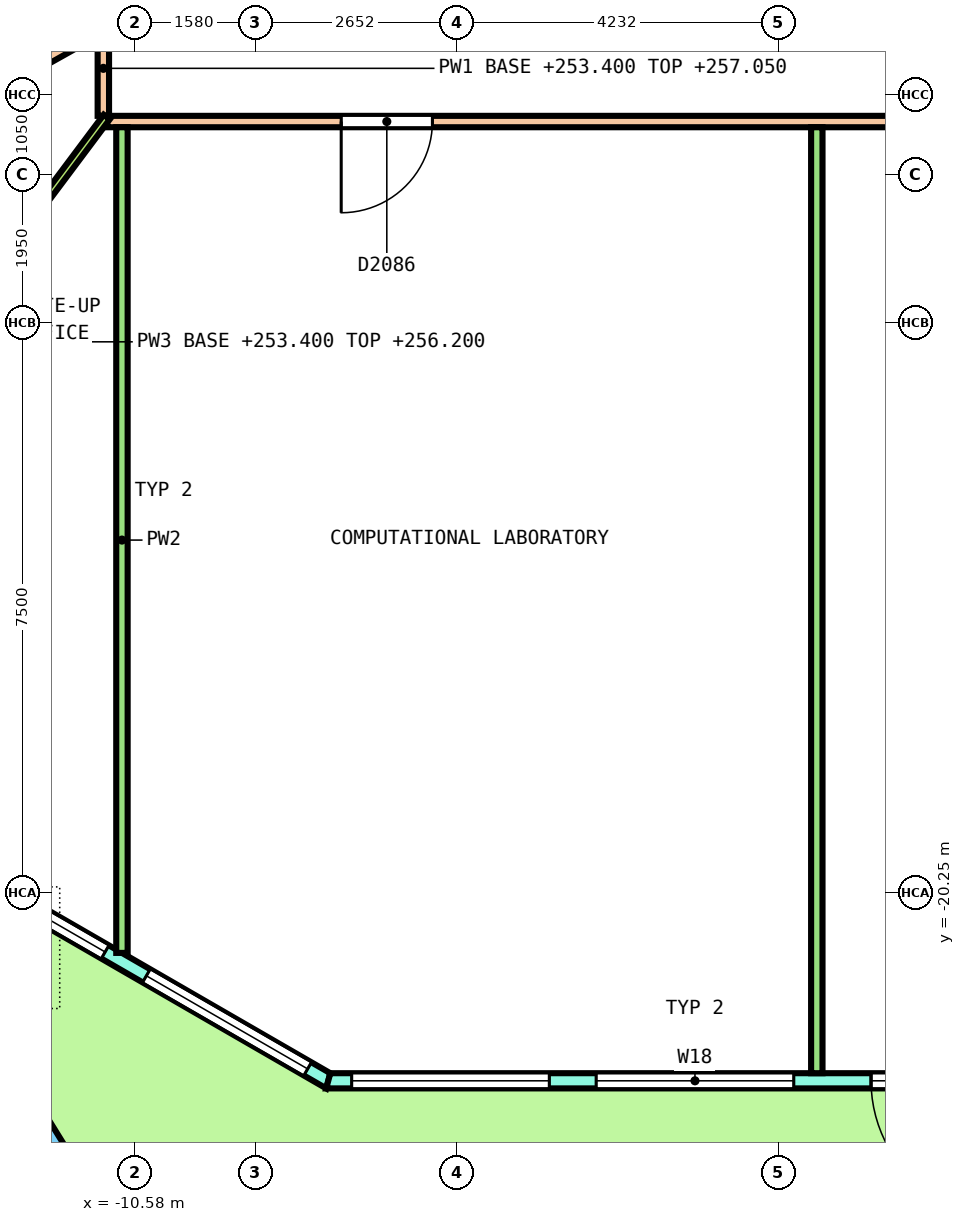
"""IFC4 building model, lengths in metres.
Left out: names, types, materials, properties, quantities, classifications, styles, units other than length and angle.
Written with IfcOpenShell. Run it as: python <this file> out.ifc"""

import sys

from ifc_helpers import new_model, si_unit, direction, frame, frame_2d, origin, origin_2d, place, context, subcontext, project, spatial, polyline, rectangle, outline, extrude, element, fill, save


model = new_model("IFC4")
c1 = context("Model", 3, precision=1e-05, world=origin(), true_north=direction((0.0, 1.0)))
c2 = subcontext(c1, "Body", "Model", "MODEL_VIEW")
j1 = project(units=[si_unit("LENGTHUNIT", "METRE"), si_unit("PLANEANGLEUNIT", "RADIAN")], contexts=[c1])
p1 = place(None, origin())
s1 = spatial("IfcSite", under=j1, at=p1, CompositionType="ELEMENT")
p2 = place(p1, origin())
s2 = spatial("IfcBuilding", under=s1, at=p2, CompositionType="ELEMENT")
p3 = place(p2, frame((0.0, 0.0, 253.4)))
s3 = spatial("IfcBuildingStorey", under=s2, at=p3, CompositionType="ELEMENT", Elevation=253.4)
p4 = place(p3, frame((-12.105, -23.606, 0.0), z_axis=(-0.177997747351, 0.308299619444, 0.934488173595), x_axis=(0.852702618945, -0.425653858356, 0.302848207046)))
e1 = element("IfcColumn", 1, at=p4, inside=s3, PredefinedType="COLUMN", context=c2, shape_type="SweptSolid", body=[
    extrude(rectangle(XDim=1.05, YDim=1.05, at=origin_2d()), origin(), (0.0, 0.0, 1.0), 3.895),
])
p5 = place(p3, frame((-13.369, -19.643, 0.0), z_axis=(0.0, 0.0, 1.0), x_axis=(0.866002544807, -0.50003959082, 0.0)))
e2 = element("IfcWall", 2, at=p5, inside=s3, PredefinedType="SOLIDWALL", context=c2, shape_type="SweptSolid", body=[
    extrude(outline(polyline([(-0.027, -0.1), (1.008, -0.1), (2.042, -0.1), (3.076, -0.1), (4.111, -0.1), (5.145, -0.1), (6.18, -0.1), (6.126, 0.1), (5.109, 0.1), (4.093, 0.1), (3.076, 0.1), (2.06, 0.1), (1.043, 0.1), (0.027, 0.1), (-0.027, -0.1)])), origin(), (0.0, 0.0, 1.0), 3.7),
])
p6 = place(p5, frame((0.313, 0.0, 0.1)))
e3 = element("IfcOpeningElement", 3, at=p6, cuts=e2, PredefinedType="OPENING", context=c2, shape_type="SweptSolid", body=[
    extrude(rectangle(XDim=2.45, YDim=2.65, at=frame_2d((1.225, 1.325))), frame((0.0, 0.11, 0.0), z_axis=(0.0, -1.0, 0.0), x_axis=(1.0, 0.0, 0.0)), (0.0, 0.0, 1.0), 0.22),
])
p7 = place(p5, frame((3.39, 0.0, 0.1)))
e4 = element("IfcOpeningElement", 4, at=p7, cuts=e2, PredefinedType="OPENING", context=c2, shape_type="SweptSolid", body=[
    extrude(rectangle(XDim=2.45, YDim=2.65, at=frame_2d((1.225, 1.325))), frame((0.0, 0.11, 0.0), z_axis=(0.0, -1.0, 0.0), x_axis=(1.0, 0.0, 0.0)), (0.0, 0.0, 1.0), 0.22),
])
p8 = place(p3, frame((-8.041, -22.72, 0.0), z_axis=(0.0, 0.0, 1.0), x_axis=(1.0, 0.0, 0.0)))
e5 = element("IfcWall", 5, at=p8, inside=s3, PredefinedType="SOLIDWALL", context=c2, shape_type="SweptSolid", body=[
    extrude(outline(polyline([(-0.027, -0.1), (0.982, -0.1), (1.99, -0.1), (2.999, -0.1), (4.007, -0.1), (5.016, -0.1), (6.024, -0.1), (7.032, -0.1), (8.041, -0.1), (9.05, -0.1), (10.058, -0.1), (11.066, -0.1), (12.075, -0.1), (13.083, -0.1), (14.092, -0.1), (15.1, -0.1), (16.109, -0.1), (16.055, 0.1), (15.053, 0.1), (14.052, 0.1), (13.05, 0.1), (12.048, 0.1), (11.046, 0.1), (10.044, 0.1), (9.043, 0.1), (8.041, 0.1), (7.039, 0.1), (6.038, 0.1), (5.036, 0.1), (4.034, 0.1), (3.032, 0.1), (2.03, 0.1), (1.029, 0.1), (0.027, 0.1), (-0.027, -0.1)])), origin(), (0.0, 0.0, 1.0), 3.7),
])
p9 = place(p8, frame((0.308, 0.0, 0.1)))
e6 = element("IfcOpeningElement", 6, at=p9, cuts=e5, PredefinedType="OPENING", context=c2, shape_type="SweptSolid", body=[
    extrude(rectangle(XDim=2.6, YDim=2.65, at=frame_2d((1.3, 1.325))), frame((0.0, 0.11, 0.0), z_axis=(0.0, -1.0, 0.0), x_axis=(1.0, 0.0, 0.0)), (0.0, 0.0, 1.0), 0.22),
])
p10 = place(p8, frame((3.524, 0.0, 0.1)))
e7 = element("IfcOpeningElement", 7, at=p10, cuts=e5, PredefinedType="OPENING", context=c2, shape_type="SweptSolid", body=[
    extrude(rectangle(XDim=2.6, YDim=2.65, at=frame_2d((1.3, 1.325))), frame((0.0, 0.11, 0.0), z_axis=(0.0, -1.0, 0.0), x_axis=(1.0, 0.0, 0.0)), (0.0, 0.0, 1.0), 0.22),
])
p11 = place(p8, frame((7.141, 0.0, 0.0)))
e8 = element("IfcOpeningElement", 8, at=p11, cuts=e5, PredefinedType="OPENING", context=c2, shape_type="SweptSolid", body=[
    extrude(rectangle(XDim=1.8, YDim=2.4, at=frame_2d((0.9, 1.2))), frame((0.0, 0.11, 0.0), z_axis=(0.0, -1.0, 0.0), x_axis=(1.0, 0.0, 0.0)), (0.0, 0.0, 1.0), 0.22),
])
p12 = place(p8, frame((7.141, 0.0, 2.55)))
e9 = element("IfcOpeningElement", 9, at=p12, cuts=e5, PredefinedType="OPENING", context=c2, shape_type="SweptSolid", body=[
    extrude(rectangle(XDim=1.8, YDim=0.2, at=frame_2d((0.9, 0.1))), frame((0.0, 0.11, 0.0), z_axis=(0.0, -1.0, 0.0), x_axis=(1.0, 0.0, 0.0)), (0.0, 0.0, 1.0), 0.22),
])
p13 = place(p8, frame((9.957, 0.0, 0.1)))
e10 = element("IfcOpeningElement", 10, at=p13, cuts=e5, PredefinedType="OPENING", context=c2, shape_type="SweptSolid", body=[
    extrude(rectangle(XDim=2.6, YDim=2.65, at=frame_2d((1.3, 1.325))), frame((0.0, 0.11, 0.0), z_axis=(0.0, -1.0, 0.0), x_axis=(1.0, 0.0, 0.0)), (0.0, 0.0, 1.0), 0.22),
])
p14 = place(p8, frame((13.174, 0.0, 0.1)))
e11 = element("IfcOpeningElement", 11, at=p14, cuts=e5, PredefinedType="OPENING", context=c2, shape_type="SweptSolid", body=[
    extrude(rectangle(XDim=2.6, YDim=2.65, at=frame_2d((1.3, 1.325))), frame((0.0, 0.11, 0.0), z_axis=(0.0, -1.0, 0.0), x_axis=(1.0, 0.0, 0.0)), (0.0, 0.0, 1.0), 0.22),
])
p15 = place(p3, frame((-17.41, -12.446, 0.0), z_axis=(0.0, 0.0, 1.0), x_axis=(0.872150376128, 0.489237898592, 0.0)))
e12 = element("IfcWall", 12, at=p15, inside=s3, PredefinedType="PARTITIONING", context=c2, shape_type="SweptSolid", body=[
    extrude(rectangle(XDim=7.274, YDim=0.15, at=frame_2d((3.637, 0.0))), origin(), (0.0, 0.0, 1.0), 3.65),
])
p16 = place(p15, frame((1.762, 0.0, 0.0)))
e13 = element("IfcOpeningElement", 13, at=p16, cuts=e12, PredefinedType="OPENING", context=c2, shape_type="SweptSolid", body=[
    extrude(rectangle(XDim=1.0, YDim=2.1, at=frame_2d((0.5, 1.05))), frame((0.0, 0.085, 0.0), z_axis=(0.0, -1.0, 0.0), x_axis=(1.0, 0.0, 0.0)), (0.0, 0.0, 1.0), 0.17),
])
p17 = place(p3, frame((-11.0, -10.025, 0.0), z_axis=(0.0, 0.0, 1.0), x_axis=(0.0, 1.0, 0.0)))
e14 = element("IfcWall", 14, at=p17, inside=s3, PredefinedType="PARTITIONING", context=c2, shape_type="SweptSolid", body=[
    extrude(rectangle(XDim=1.25, YDim=0.15, at=frame_2d((0.625, 0.0))), origin(), (0.0, 0.0, 1.0), 3.65),
])
p18 = place(p3, frame((-10.95, -10.1, 0.0), z_axis=(0.0, 0.0, 1.0), x_axis=(1.0, 0.0, 0.0)))
e15 = element("IfcWall", 15, at=p18, inside=s3, PredefinedType="PARTITIONING", context=c2, shape_type="SweptSolid", body=[
    extrude(rectangle(XDim=21.875, YDim=0.15, at=frame_2d((10.938, 0.0))), origin(), (0.0, 0.0, 1.0), 2.8),
])
p19 = place(p18, frame((3.079, 0.0, 0.0)))
e16 = element("IfcOpeningElement", 16, at=p19, cuts=e15, PredefinedType="OPENING", context=c2, shape_type="SweptSolid", body=[
    extrude(rectangle(XDim=1.2, YDim=2.1, at=frame_2d((0.6, 1.05))), frame((0.0, 0.085, 0.0), z_axis=(0.0, -1.0, 0.0), x_axis=(1.0, 0.0, 0.0)), (0.0, 0.0, 1.0), 0.17),
])
p20 = place(p18, frame((14.744, 0.0, 0.0)))
e17 = element("IfcOpeningElement", 17, at=p20, cuts=e15, PredefinedType="OPENING", context=c2, shape_type="SweptSolid", body=[
    extrude(rectangle(XDim=1.2, YDim=2.1, at=frame_2d((0.6, 1.05))), frame((0.0, 0.085, 0.0), z_axis=(0.0, -1.0, 0.0), x_axis=(1.0, 0.0, 0.0)), (0.0, 0.0, 1.0), 0.17),
])
p21 = place(p18, frame((20.169, 0.0, 0.0)))
e18 = element("IfcOpeningElement", 18, at=p21, cuts=e15, PredefinedType="OPENING", context=c2, shape_type="SweptSolid", body=[
    extrude(rectangle(XDim=1.0, YDim=2.1, at=frame_2d((0.5, 1.05))), frame((0.0, 0.085, 0.0), z_axis=(0.0, -1.0, 0.0), x_axis=(1.0, 0.0, 0.0)), (0.0, 0.0, 1.0), 0.17),
])
p22 = place(p3, frame((-10.755, -21.037, 0.0), z_axis=(0.0, 0.0, 1.0), x_axis=(0.0, 1.0, 0.0)))
e19 = element("IfcWall", 19, at=p22, inside=s3, PredefinedType="PARTITIONING", context=c2, shape_type="SweptSolid", body=[
    extrude(rectangle(XDim=10.862, YDim=0.15, at=frame_2d((5.431, 0.0))), origin(), (0.0, 0.0, 1.0), 2.8),
])
p23 = place(p3, frame((-1.614, -22.62, 0.0), z_axis=(0.0, 0.0, 1.0), x_axis=(0.0, 1.0, 0.0)))
e20 = element("IfcWall", 20, at=p23, inside=s3, PredefinedType="PARTITIONING", context=c2, shape_type="SweptSolid", body=[
    extrude(rectangle(XDim=12.445, YDim=0.15, at=frame_2d((6.222, 0.0))), origin(), (0.0, 0.0, 1.0), 2.8),
])
p24 = place(p3, frame((-15.383, -15.956, 0.0), z_axis=(0.0, 0.0, 1.0), x_axis=(0.599233213561, 0.800574516061, 0.0)))
e21 = element("IfcWall", 21, at=p24, inside=s3, PredefinedType="PARTITIONING", context=c2, shape_type="SweptSolid", body=[
    extrude(rectangle(XDim=7.389, YDim=0.1, at=frame_2d((3.695, 0.0))), origin(), (0.0, 0.0, 1.0), 2.8),
])
p25 = place(p24, frame((3.157, 0.0, 0.0)))
e22 = element("IfcOpeningElement", 22, at=p25, cuts=e21, PredefinedType="OPENING", context=c2, shape_type="SweptSolid", body=[
    extrude(rectangle(XDim=1.0, YDim=2.1, at=frame_2d((0.5, 1.05))), frame((0.0, 0.06, 0.0), z_axis=(0.0, -1.0, 0.0), x_axis=(1.0, 0.0, 0.0)), (0.0, 0.0, 1.0), 0.12),
])
p26 = place(p6, origin())
e23 = element("IfcWindow", 23, at=p26, inside=s3, PartitioningType="SINGLE_PANEL", PredefinedType="WINDOW", context=c2, shape_type="SweptSolid", body=[
    extrude(rectangle(XDim=2.45, YDim=2.65, at=frame_2d((1.225, 1.325))), frame((0.0, 0.03, 0.0), z_axis=(0.0, -1.0, 0.0), x_axis=(1.0, 0.0, 0.0)), (0.0, 0.0, 1.0), 0.06),
])
fill(e3, e23)
p27 = place(p7, origin())
e24 = element("IfcWindow", 24, at=p27, inside=s3, PartitioningType="SINGLE_PANEL", PredefinedType="WINDOW", context=c2, shape_type="SweptSolid", body=[
    extrude(rectangle(XDim=2.45, YDim=2.65, at=frame_2d((1.225, 1.325))), frame((0.0, 0.03, 0.0), z_axis=(0.0, -1.0, 0.0), x_axis=(1.0, 0.0, 0.0)), (0.0, 0.0, 1.0), 0.06),
])
fill(e4, e24)
p28 = place(p9, origin())
e25 = element("IfcWindow", 25, at=p28, inside=s3, PartitioningType="SINGLE_PANEL", PredefinedType="WINDOW", context=c2, shape_type="SweptSolid", body=[
    extrude(rectangle(XDim=2.6, YDim=2.65, at=frame_2d((1.3, 1.325))), frame((0.0, 0.03, 0.0), z_axis=(0.0, -1.0, 0.0), x_axis=(1.0, 0.0, 0.0)), (0.0, 0.0, 1.0), 0.06),
])
fill(e6, e25)
p29 = place(p10, origin())
e26 = element("IfcWindow", 26, at=p29, inside=s3, PartitioningType="SINGLE_PANEL", PredefinedType="WINDOW", context=c2, shape_type="SweptSolid", body=[
    extrude(rectangle(XDim=2.6, YDim=2.65, at=frame_2d((1.3, 1.325))), frame((0.0, 0.03, 0.0), z_axis=(0.0, -1.0, 0.0), x_axis=(1.0, 0.0, 0.0)), (0.0, 0.0, 1.0), 0.06),
])
fill(e7, e26)
p30 = place(p11, origin())
e27 = element("IfcDoor", 27, at=p30, inside=s3, OperationType="DOUBLE_DOOR_SINGLE_SWING", PredefinedType="DOOR", context=c2, shape_type="SweptSolid", body=[
    extrude(rectangle(XDim=1.8, YDim=2.4, at=frame_2d((0.9, 1.2))), frame((0.0, 0.025, 0.0), z_axis=(0.0, -1.0, 0.0), x_axis=(1.0, 0.0, 0.0)), (0.0, 0.0, 1.0), 0.05),
])
fill(e8, e27)
p31 = place(p12, origin())
e28 = element("IfcWindow", 28, at=p31, inside=s3, PartitioningType="SINGLE_PANEL", PredefinedType="WINDOW", context=c2, shape_type="SweptSolid", body=[
    extrude(rectangle(XDim=1.8, YDim=0.2, at=frame_2d((0.9, 0.1))), frame((0.0, 0.03, 0.0), z_axis=(0.0, -1.0, 0.0), x_axis=(1.0, 0.0, 0.0)), (0.0, 0.0, 1.0), 0.06),
])
fill(e9, e28)
p32 = place(p19, origin())
e29 = element("IfcDoor", 29, at=p32, inside=s3, OperationType="DOUBLE_DOOR_SINGLE_SWING", PredefinedType="DOOR", context=c2, shape_type="SweptSolid", body=[
    extrude(rectangle(XDim=1.2, YDim=2.1, at=frame_2d((0.6, 1.05))), frame((0.0, 0.025, 0.0), z_axis=(0.0, -1.0, 0.0), x_axis=(1.0, 0.0, 0.0)), (0.0, 0.0, 1.0), 0.05),
])
fill(e16, e29)
save(model, sys.argv[1])
